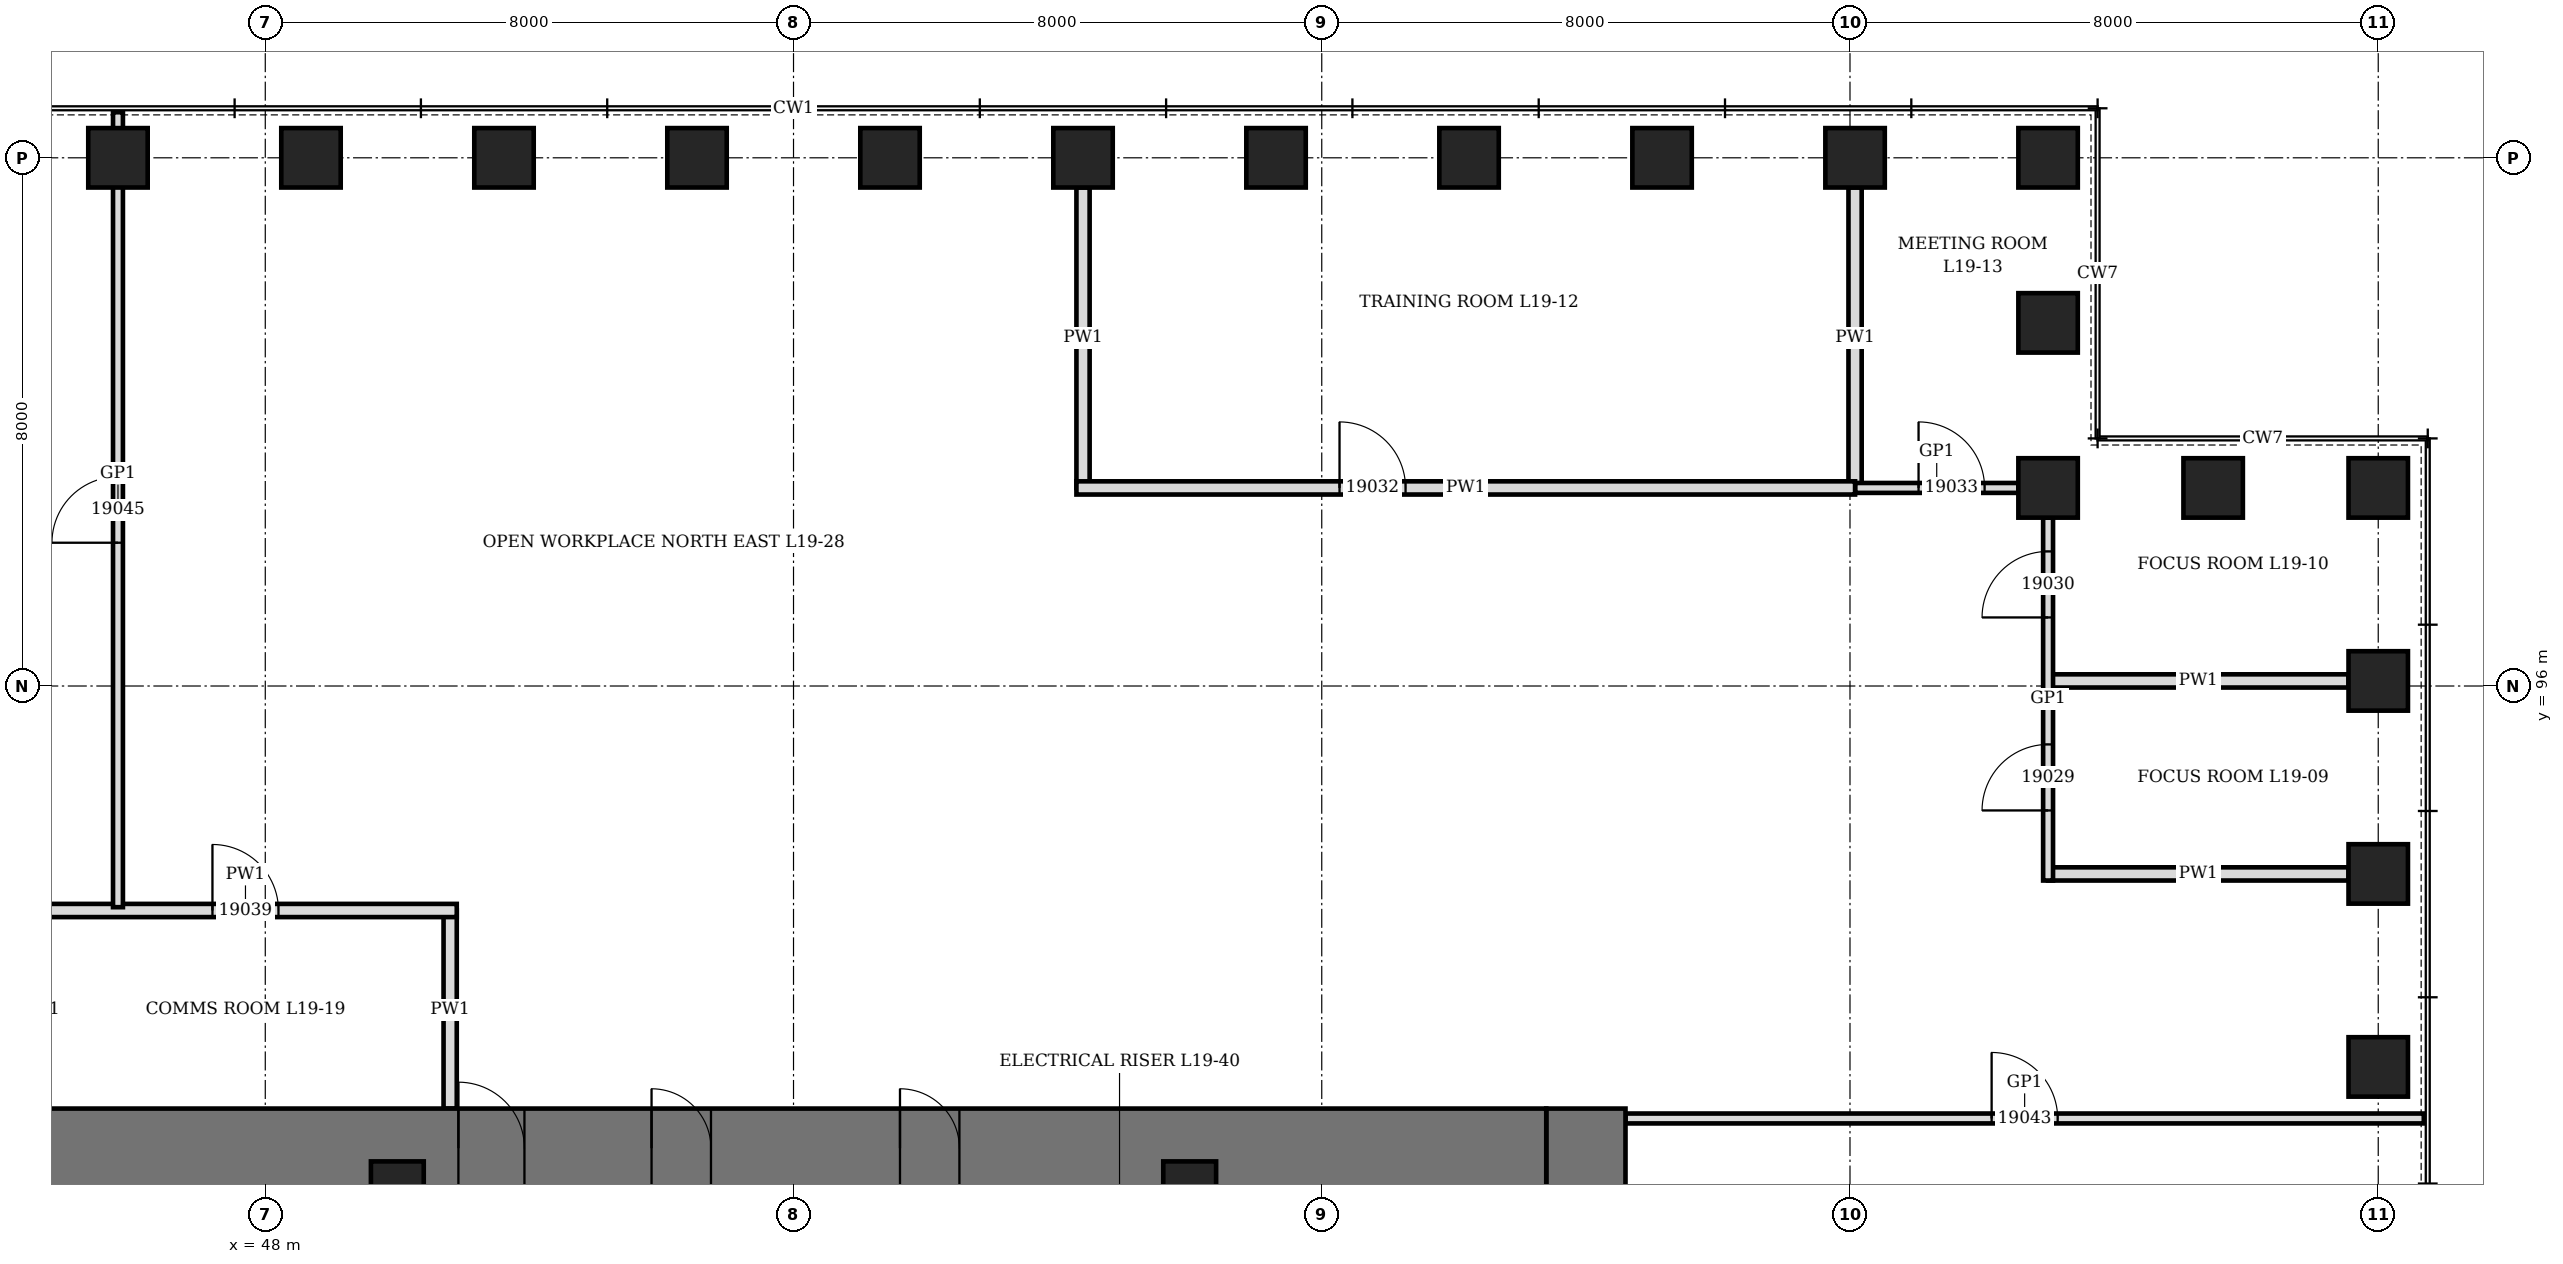
"""IFC4 building model, lengths in metres.
Left out: names, types, materials, properties, quantities, classifications, styles, units other than length and angle.
Written with IfcOpenShell. Run it as: python <this file> out.ifc"""

import sys

from ifc_helpers import new_model, si_unit, direction, frame, frame_2d, origin, origin_2d, place, context, subcontext, project, spatial, rectangle, hollow_rectangle, extrude, element, fill, save


model = new_model("IFC4")
c1 = context("Model", 3, precision=1e-05, world=origin(), true_north=direction((0.0, 1.0)))
c2 = subcontext(c1, "Body", "Model", "MODEL_VIEW")
j1 = project(units=[si_unit("LENGTHUNIT", "METRE"), si_unit("PLANEANGLEUNIT", "RADIAN")], contexts=[c1])
p1 = place(None, origin())
s1 = spatial("IfcSite", under=j1, at=p1, CompositionType="ELEMENT")
p2 = place(p1, origin())
s2 = spatial("IfcBuilding", under=s1, at=p2, CompositionType="ELEMENT")
p3 = place(p2, frame((0.0, 0.0, 89.5)))
s3 = spatial("IfcBuildingStorey", under=s2, at=p3, CompositionType="ELEMENT", Elevation=89.5)
for number, where, z_axis, x_axis in (
    (1, (80.0, 90.231, 0.0), (0.0, 0.0, 1.0), (0.0, 1.0, 0.0)),
    (2, (80.0, 93.154, 0.0), (0.0, 0.0, 1.0), (0.0, 1.0, 0.0)),
    (3, (80.0, 96.077, 0.0), (0.0, 0.0, 1.0), (0.0, 1.0, 0.0)),
    (4, (80.0, 99.0, 0.0), (0.0, 0.0, 1.0), (1.0, 0.0, 0.0)),
    (5, (77.5, 99.0, 0.0), (0.0, 0.0, 1.0), (1.0, 0.0, 0.0)),
    (6, (75.0, 99.0, 0.0), (0.0, 0.0, 1.0), (0.0, 1.0, 0.0)),
    (7, (75.0, 101.5, 0.0), (0.0, 0.0, 1.0), (0.0, 1.0, 0.0)),
    (8, (75.0, 104.0, 0.0), (0.0, 0.0, 1.0), (1.0, 0.0, 0.0)),
    (9, (72.077, 104.0, 0.0), (0.0, 0.0, 1.0), (1.0, 0.0, 0.0)),
    (10, (69.154, 104.0, 0.0), (0.0, 0.0, 1.0), (1.0, 0.0, 0.0)),
    (11, (66.231, 104.0, 0.0), (0.0, 0.0, 1.0), (1.0, 0.0, 0.0)),
    (12, (63.308, 104.0, 0.0), (0.0, 0.0, 1.0), (1.0, 0.0, 0.0)),
    (13, (60.385, 104.0, 0.0), (0.0, 0.0, 1.0), (1.0, 0.0, 0.0)),
    (14, (57.461, 104.0, 0.0), (0.0, 0.0, 1.0), (1.0, 0.0, 0.0)),
    (15, (54.539, 104.0, 0.0), (0.0, 0.0, 1.0), (1.0, 0.0, 0.0)),
    (16, (51.615, 104.0, 0.0), (0.0, 0.0, 1.0), (1.0, 0.0, 0.0)),
    (17, (48.692, 104.0, 0.0), (0.0, 0.0, 1.0), (1.0, 0.0, 0.0)),
    (18, (45.769, 104.0, 0.0), (0.0, 0.0, 1.0), (1.0, 0.0, 0.0)),
):
    element("IfcColumn", number, at=place(p3, frame(where, z_axis=z_axis, x_axis=x_axis)), inside=s3, PredefinedType="COLUMN", context=c2, shape_type="SweptSolid", body=[
        extrude(hollow_rectangle(XDim=0.9, YDim=0.9, WallThickness=0.12, at=origin_2d()), origin(), (0.0, 0.0, 1.0), 4.2),
    ])
p4 = place(p3, frame((68.0, 70.4, 0.0), z_axis=(0.0, 0.0, 1.0), x_axis=(0.0, 1.0, 0.0)))
e19 = element("IfcWall", 19, at=p4, inside=s3, PredefinedType="SHEAR", context=c2, shape_type="SweptSolid", body=[
    extrude(rectangle(XDim=19.2, YDim=1.2, at=frame_2d((9.6, 0.0))), origin(), (0.0, 0.0, 1.0), 4.2),
])
p5 = place(p4, frame((8.6, 0.0, 0.0)))
e20 = element("IfcOpeningElement", 20, at=p5, cuts=e19, PredefinedType="OPENING", context=c2, shape_type="SweptSolid", body=[
    extrude(rectangle(XDim=2.0, YDim=2.4, at=frame_2d((1.0, 1.2))), frame((0.0, 0.61, 0.0), z_axis=(0.0, -1.0, 0.0), x_axis=(1.0, 0.0, 0.0)), (0.0, 0.0, 1.0), 1.22),
])
p6 = place(p3, frame((44.6, 89.0, 0.0), z_axis=(0.0, 0.0, 1.0), x_axis=(1.0, 0.0, 0.0)))
e21 = element("IfcWall", 21, at=p6, inside=s3, PredefinedType="SHEAR", context=c2, shape_type="SweptSolid", body=[
    extrude(rectangle(XDim=22.8, YDim=1.2, at=frame_2d((11.4, 0.0))), origin(), (0.0, 0.0, 1.0), 4.2),
])
p7 = place(p6, frame((6.325, 0.0, 0.0)))
e22 = element("IfcOpeningElement", 22, at=p7, cuts=e21, PredefinedType="OPENING", context=c2, shape_type="SweptSolid", body=[
    extrude(rectangle(XDim=1.0, YDim=2.1, at=frame_2d((0.5, 1.05))), frame((0.0, 0.61, 0.0), z_axis=(0.0, -1.0, 0.0), x_axis=(1.0, 0.0, 0.0)), (0.0, 0.0, 1.0), 1.22),
])
p8 = place(p6, frame((9.25, 0.0, 0.0)))
e23 = element("IfcOpeningElement", 23, at=p8, cuts=e21, PredefinedType="OPENING", context=c2, shape_type="SweptSolid", body=[
    extrude(rectangle(XDim=0.9, YDim=2.1, at=frame_2d((0.45, 1.05))), frame((0.0, 0.61, 0.0), z_axis=(0.0, -1.0, 0.0), x_axis=(1.0, 0.0, 0.0)), (0.0, 0.0, 1.0), 1.22),
])
p9 = place(p6, frame((13.012, 0.0, 0.0)))
e24 = element("IfcOpeningElement", 24, at=p9, cuts=e21, PredefinedType="OPENING", context=c2, shape_type="SweptSolid", body=[
    extrude(rectangle(XDim=0.9, YDim=2.1, at=frame_2d((0.45, 1.05))), frame((0.0, 0.61, 0.0), z_axis=(0.0, -1.0, 0.0), x_axis=(1.0, 0.0, 0.0)), (0.0, 0.0, 1.0), 1.22),
])
for number, where, z_axis, x_axis in (
    (25, (50.0, 88.4, 0.0), (0.0, 0.0, 1.0), (1.0, 0.0, 0.0)),
    (26, (62.0, 88.4, 0.0), (0.0, 0.0, 1.0), (1.0, 0.0, 0.0)),
):
    element("IfcColumn", number, at=place(p3, frame(where, z_axis=z_axis, x_axis=x_axis)), inside=s3, PredefinedType="COLUMN", context=c2, shape_type="SweptSolid", body=[
        extrude(hollow_rectangle(XDim=0.8, YDim=0.8, WallThickness=0.1, at=origin_2d()), origin(), (0.0, 0.0, 1.0), 4.2),
    ])
for number, where, z_axis, x_axis in (
    (27, (75.0, 93.154, 0.0), (0.0, 0.0, 1.0), (1.0, 0.0, 0.0)),
    (28, (75.0, 96.077, 0.0), (0.0, 0.0, 1.0), (1.0, 0.0, 0.0)),
):
    element("IfcWall", number, at=place(p3, frame(where, z_axis=z_axis, x_axis=x_axis)), inside=s3, PredefinedType="PARTITIONING", context=c2, shape_type="SweptSolid", body=[
        extrude(rectangle(XDim=4.55, YDim=0.2, at=frame_2d((2.275, 0.0))), origin(), (0.0, 0.0, 1.0), 3.428),
    ])
p10 = place(p3, frame((60.385, 99.0, 0.0), z_axis=(0.0, 0.0, 1.0), x_axis=(0.0, 1.0, 0.0)))
e29 = element("IfcWall", 29, at=p10, inside=s3, PredefinedType="PARTITIONING", context=c2, shape_type="SweptSolid", body=[
    extrude(rectangle(XDim=4.55, YDim=0.2, at=frame_2d((2.275, 0.0))), origin(), (0.0, 0.0, 1.0), 3.278),
])
p11 = place(p3, frame((72.077, 99.0, 0.0), z_axis=(0.0, 0.0, 1.0), x_axis=(0.0, 1.0, 0.0)))
e30 = element("IfcWall", 30, at=p11, inside=s3, PredefinedType="PARTITIONING", context=c2, shape_type="SweptSolid", body=[
    extrude(rectangle(XDim=4.55, YDim=0.2, at=frame_2d((2.275, 0.0))), origin(), (0.0, 0.0, 1.0), 3.428),
])
p12 = place(p3, frame((50.8, 89.6, 0.0), z_axis=(0.0, 0.0, 1.0), x_axis=(0.0, 1.0, 0.0)))
e31 = element("IfcWall", 31, at=p12, inside=s3, PredefinedType="PARTITIONING", context=c2, shape_type="SweptSolid", body=[
    extrude(rectangle(XDim=3.0, YDim=0.2, at=frame_2d((1.5, 0.0))), origin(), (0.0, 0.0, 1.0), 4.04),
])
p13 = place(p3, frame((68.6, 89.45, 0.0), z_axis=(0.0, 0.0, 1.0), x_axis=(1.0, 0.0, 0.0)))
e32 = element("IfcWall", 32, at=p13, inside=s3, PredefinedType="PARTITIONING", context=c2, shape_type="SweptSolid", body=[
    extrude(rectangle(XDim=12.09, YDim=0.15, at=frame_2d((6.045, 0.0))), origin(), (0.0, 0.0, 1.0), 4.04),
])
p14 = place(p13, frame((5.545, 0.0, 0.0)))
e33 = element("IfcOpeningElement", 33, at=p14, cuts=e32, PredefinedType="OPENING", context=c2, shape_type="SweptSolid", body=[
    extrude(rectangle(XDim=1.0, YDim=2.4, at=frame_2d((0.5, 1.2))), frame((0.0, 0.085, 0.0), z_axis=(0.0, -1.0, 0.0), x_axis=(1.0, 0.0, 0.0)), (0.0, 0.0, 1.0), 0.17),
])
p15 = place(p3, frame((44.5, 92.6, 0.0), z_axis=(0.0, 0.0, 1.0), x_axis=(1.0, 0.0, 0.0)))
e34 = element("IfcWall", 34, at=p15, inside=s3, PredefinedType="PARTITIONING", context=c2, shape_type="SweptSolid", body=[
    extrude(rectangle(XDim=6.4, YDim=0.2, at=frame_2d((3.2, 0.0))), origin(), (0.0, 0.0, 1.0), 4.04),
])
p16 = place(p15, frame((2.7, 0.0, 0.0)))
e35 = element("IfcOpeningElement", 35, at=p16, cuts=e34, PredefinedType="OPENING", context=c2, shape_type="SweptSolid", body=[
    extrude(rectangle(XDim=1.0, YDim=2.1, at=frame_2d((0.5, 1.05))), frame((0.0, 0.11, 0.0), z_axis=(0.0, -1.0, 0.0), x_axis=(1.0, 0.0, 0.0)), (0.0, 0.0, 1.0), 0.22),
])
p17 = place(p3, frame((72.077, 99.0, 0.0), z_axis=(0.0, 0.0, 1.0), x_axis=(1.0, 0.0, 0.0)))
e36 = element("IfcWall", 36, at=p17, inside=s3, PredefinedType="PARTITIONING", context=c2, shape_type="SweptSolid", body=[
    extrude(rectangle(XDim=2.473, YDim=0.15, at=frame_2d((1.237, 0.0))), origin(), (0.0, 0.0, 1.0), 4.04),
])
p18 = place(p17, frame((0.961, 0.0, 0.0)))
e37 = element("IfcOpeningElement", 37, at=p18, cuts=e36, PredefinedType="OPENING", context=c2, shape_type="SweptSolid", body=[
    extrude(rectangle(XDim=1.0, YDim=2.4, at=frame_2d((0.5, 1.2))), frame((0.0, 0.085, 0.0), z_axis=(0.0, -1.0, 0.0), x_axis=(1.0, 0.0, 0.0)), (0.0, 0.0, 1.0), 0.17),
])
p19 = place(p3, frame((60.285, 99.0, 0.0), z_axis=(0.0, 0.0, 1.0), x_axis=(1.0, 0.0, 0.0)))
e38 = element("IfcWall", 38, at=p19, inside=s3, PredefinedType="PARTITIONING", context=c2, shape_type="SweptSolid", body=[
    extrude(rectangle(XDim=11.792, YDim=0.2, at=frame_2d((5.896, 0.0))), origin(), (0.0, 0.0, 1.0), 4.04),
])
p20 = place(p19, frame((3.985, 0.0, 0.0)))
e39 = element("IfcOpeningElement", 39, at=p20, cuts=e38, PredefinedType="OPENING", context=c2, shape_type="SweptSolid", body=[
    extrude(rectangle(XDim=1.0, YDim=2.1, at=frame_2d((0.5, 1.05))), frame((0.0, 0.11, 0.0), z_axis=(0.0, -1.0, 0.0), x_axis=(1.0, 0.0, 0.0)), (0.0, 0.0, 1.0), 0.22),
])
p21 = place(p3, frame((45.769, 92.65, 0.0), z_axis=(0.0, 0.0, 1.0), x_axis=(0.0, 1.0, 0.0)))
e40 = element("IfcWall", 40, at=p21, inside=s3, PredefinedType="PARTITIONING", context=c2, shape_type="SweptSolid", body=[
    extrude(rectangle(XDim=12.04, YDim=0.15, at=frame_2d((6.02, 0.0))), origin(), (0.0, 0.0, 1.0), 3.278),
])
p22 = place(p21, frame((5.52, 0.0, 0.0)))
e41 = element("IfcOpeningElement", 41, at=p22, cuts=e40, PredefinedType="OPENING", context=c2, shape_type="SweptSolid", body=[
    extrude(rectangle(XDim=1.0, YDim=2.4, at=frame_2d((0.5, 1.2))), frame((0.0, 0.085, 0.0), z_axis=(0.0, -1.0, 0.0), x_axis=(1.0, 0.0, 0.0)), (0.0, 0.0, 1.0), 0.17),
])
p23 = place(p3, frame((75.0, 93.054, 0.0), z_axis=(0.0, 0.0, 1.0), x_axis=(0.0, 1.0, 0.0)))
e42 = element("IfcWall", 42, at=p23, inside=s3, PredefinedType="PARTITIONING", context=c2, shape_type="SweptSolid", body=[
    extrude(rectangle(XDim=5.496, YDim=0.15, at=frame_2d((2.748, 0.0))), origin(), (0.0, 0.0, 1.0), 4.04),
])
p24 = place(p23, frame((1.062, 0.0, 0.0)))
e43 = element("IfcOpeningElement", 43, at=p24, cuts=e42, PredefinedType="OPENING", context=c2, shape_type="SweptSolid", body=[
    extrude(rectangle(XDim=1.0, YDim=2.4, at=frame_2d((0.5, 1.2))), frame((0.0, 0.085, 0.0), z_axis=(0.0, -1.0, 0.0), x_axis=(1.0, 0.0, 0.0)), (0.0, 0.0, 1.0), 0.17),
])
p25 = place(p23, frame((3.985, 0.0, 0.0)))
e44 = element("IfcOpeningElement", 44, at=p25, cuts=e42, PredefinedType="OPENING", context=c2, shape_type="SweptSolid", body=[
    extrude(rectangle(XDim=1.0, YDim=2.4, at=frame_2d((0.5, 1.2))), frame((0.0, 0.085, 0.0), z_axis=(0.0, -1.0, 0.0), x_axis=(1.0, 0.0, 0.0)), (0.0, 0.0, 1.0), 0.17),
])
p26 = place(p7, origin())
e45 = element("IfcDoor", 45, at=p26, inside=s3, OperationType="SINGLE_SWING_LEFT", PredefinedType="DOOR", context=c2, shape_type="SweptSolid", body=[
    extrude(rectangle(XDim=1.0, YDim=2.1, at=frame_2d((0.5, 1.05))), frame((0.0, 0.35, 0.0), z_axis=(0.0, -1.0, 0.0), x_axis=(1.0, 0.0, 0.0)), (0.0, 0.0, 1.0), 0.7),
])
fill(e22, e45)
p27 = place(p8, origin())
e46 = element("IfcDoor", 46, at=p27, inside=s3, OperationType="SINGLE_SWING_LEFT", PredefinedType="DOOR", context=c2, shape_type="SweptSolid", body=[
    extrude(rectangle(XDim=0.9, YDim=2.1, at=frame_2d((0.45, 1.05))), frame((0.0, 0.35, 0.0), z_axis=(0.0, -1.0, 0.0), x_axis=(1.0, 0.0, 0.0)), (0.0, 0.0, 1.0), 0.7),
])
fill(e23, e46)
p28 = place(p9, origin())
e47 = element("IfcDoor", 47, at=p28, inside=s3, OperationType="SINGLE_SWING_LEFT", PredefinedType="DOOR", context=c2, shape_type="SweptSolid", body=[
    extrude(rectangle(XDim=0.9, YDim=2.1, at=frame_2d((0.45, 1.05))), frame((0.0, 0.35, 0.0), z_axis=(0.0, -1.0, 0.0), x_axis=(1.0, 0.0, 0.0)), (0.0, 0.0, 1.0), 0.7),
])
fill(e24, e47)
p29 = place(p24, origin())
e48 = element("IfcDoor", 48, at=p29, inside=s3, OperationType="SINGLE_SWING_RIGHT", PredefinedType="DOOR", context=c2, shape_type="SweptSolid", body=[
    extrude(rectangle(XDim=1.0, YDim=2.4, at=frame_2d((0.5, 1.2))), frame((0.0, 0.075, 0.0), z_axis=(0.0, -1.0, 0.0), x_axis=(1.0, 0.0, 0.0)), (0.0, 0.0, 1.0), 0.149),
])
fill(e43, e48)
p30 = place(p25, origin())
e49 = element("IfcDoor", 49, at=p30, inside=s3, OperationType="SINGLE_SWING_RIGHT", PredefinedType="DOOR", context=c2, shape_type="SweptSolid", body=[
    extrude(rectangle(XDim=1.0, YDim=2.4, at=frame_2d((0.5, 1.2))), frame((0.0, 0.075, 0.0), z_axis=(0.0, -1.0, 0.0), x_axis=(1.0, 0.0, 0.0)), (0.0, 0.0, 1.0), 0.149),
])
fill(e44, e49)
p31 = place(p20, origin())
e50 = element("IfcDoor", 50, at=p31, inside=s3, OperationType="SINGLE_SWING_LEFT", PredefinedType="DOOR", context=c2, shape_type="SweptSolid", body=[
    extrude(rectangle(XDim=1.0, YDim=2.1, at=frame_2d((0.5, 1.05))), frame((0.0, 0.1, 0.0), z_axis=(0.0, -1.0, 0.0), x_axis=(1.0, 0.0, 0.0)), (0.0, 0.0, 1.0), 0.199),
])
fill(e39, e50)
p32 = place(p18, origin())
e51 = element("IfcDoor", 51, at=p32, inside=s3, OperationType="SINGLE_SWING_RIGHT", PredefinedType="DOOR", context=c2, shape_type="SweptSolid", body=[
    extrude(rectangle(XDim=1.0, YDim=2.4, at=frame_2d((0.5, 1.2))), frame((0.0, 0.075, 0.0), z_axis=(0.0, -1.0, 0.0), x_axis=(1.0, 0.0, 0.0)), (0.0, 0.0, 1.0), 0.149),
])
fill(e37, e51)
p33 = place(p16, origin())
e52 = element("IfcDoor", 52, at=p33, inside=s3, OperationType="SINGLE_SWING_LEFT", PredefinedType="DOOR", context=c2, shape_type="SweptSolid", body=[
    extrude(rectangle(XDim=1.0, YDim=2.1, at=frame_2d((0.5, 1.05))), frame((0.0, 0.1, 0.0), z_axis=(0.0, -1.0, 0.0), x_axis=(1.0, 0.0, 0.0)), (0.0, 0.0, 1.0), 0.199),
])
fill(e35, e52)
p34 = place(p14, origin())
e53 = element("IfcDoor", 53, at=p34, inside=s3, OperationType="SINGLE_SWING_RIGHT", PredefinedType="DOOR", context=c2, shape_type="SweptSolid", body=[
    extrude(rectangle(XDim=1.0, YDim=2.4, at=frame_2d((0.5, 1.2))), frame((0.0, 0.075, 0.0), z_axis=(0.0, -1.0, 0.0), x_axis=(1.0, 0.0, 0.0)), (0.0, 0.0, 1.0), 0.149),
])
fill(e33, e53)
p35 = place(p22, origin())
e54 = element("IfcDoor", 54, at=p35, inside=s3, OperationType="SINGLE_SWING_RIGHT", PredefinedType="DOOR", context=c2, shape_type="SweptSolid", body=[
    extrude(rectangle(XDim=1.0, YDim=2.4, at=frame_2d((0.5, 1.2))), frame((0.0, 0.075, 0.0), z_axis=(0.0, -1.0, 0.0), x_axis=(1.0, 0.0, 0.0)), (0.0, 0.0, 1.0), 0.149),
])
fill(e41, e54)
save(model, sys.argv[1])
